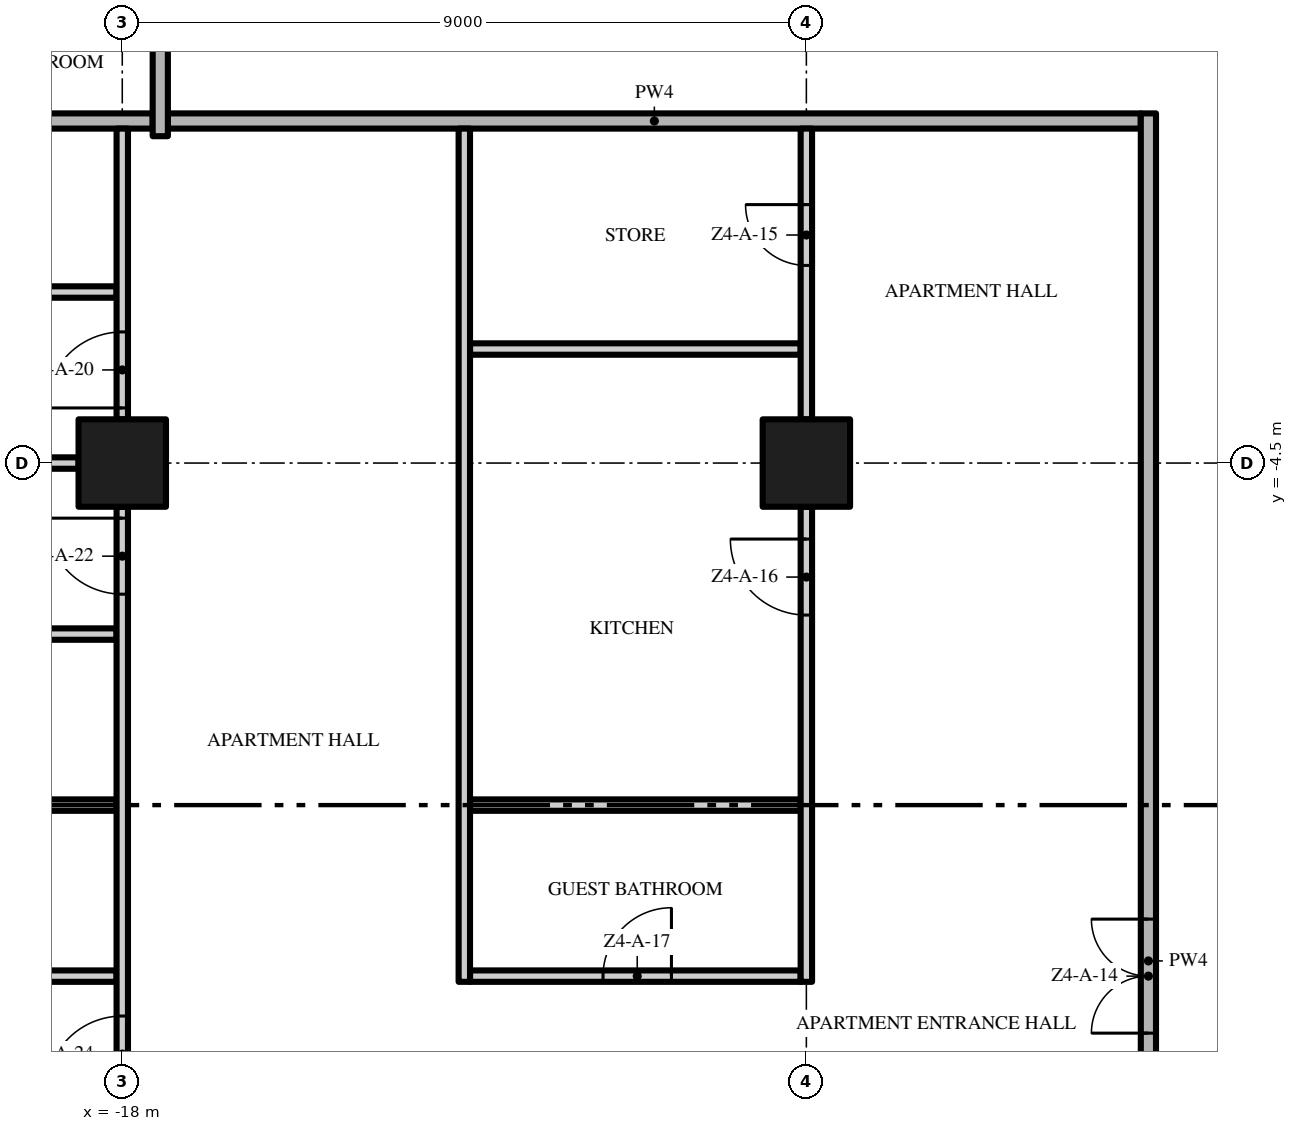
"""IFC4 building model, lengths in metres.
Left out: names, types, materials, properties, quantities, classifications, styles, units other than length and angle.
Written with IfcOpenShell. Run it as: python <this file> out.ifc"""

import sys

from ifc_helpers import new_model, si_unit, direction, frame, frame_2d, origin, origin_2d, place, context, subcontext, project, spatial, rectangle, extrude, element, fill, save


model = new_model("IFC4")
c1 = context("Model", 3, precision=1e-05, world=origin(), true_north=direction((0.0, 1.0)))
c2 = subcontext(c1, "Body", "Model", "MODEL_VIEW")
j1 = project(units=[si_unit("LENGTHUNIT", "METRE"), si_unit("PLANEANGLEUNIT", "RADIAN")], contexts=[c1])
p1 = place(None, origin())
s1 = spatial("IfcSite", under=j1, at=p1, CompositionType="ELEMENT")
p2 = place(p1, origin())
s2 = spatial("IfcBuilding", under=s1, at=p2, CompositionType="ELEMENT")
p3 = place(p2, frame((0.0, 0.0, 188.2)))
s3 = spatial("IfcBuildingStorey", under=s2, at=p3, CompositionType="ELEMENT", Elevation=188.2)
for number, where, z_axis, x_axis in (
    (1, (-18.0, -4.5, 0.0), (0.0, 0.0, 1.0), (1.0, 0.0, 0.0)),
    (2, (-9.0, -4.5, 0.0), (0.0, 0.0, 1.0), (1.0, 0.0, 0.0)),
):
    element("IfcColumn", number, at=place(p3, frame(where, z_axis=z_axis, x_axis=x_axis)), inside=s3, PredefinedType="COLUMN", context=c2, shape_type="SweptSolid", body=[
        extrude(rectangle(XDim=1.15, YDim=1.15, at=origin_2d()), origin(), (0.0, 0.0, 1.0), 3.5),
    ])
p4 = place(p3, frame((-20.925, -11.25, 0.0), z_axis=(0.0, 0.0, 1.0), x_axis=(1.0, 0.0, 0.0)))
e3 = element("IfcWall", 3, at=p4, inside=s3, PredefinedType="PARTITIONING", context=c2, shape_type="SweptSolid", body=[
    extrude(rectangle(XDim=2.85, YDim=0.15, at=frame_2d((1.425, 0.0))), origin(), (0.0, 0.0, 1.0), 3.5),
])
p5 = place(p3, frame((-13.425, -11.25, 0.0), z_axis=(0.0, 0.0, 1.0), x_axis=(1.0, 0.0, 0.0)))
e4 = element("IfcWall", 4, at=p5, inside=s3, PredefinedType="PARTITIONING", context=c2, shape_type="SweptSolid", body=[
    extrude(rectangle(XDim=4.35, YDim=0.15, at=frame_2d((2.175, 0.0))), origin(), (0.0, 0.0, 1.0), 3.5),
])
p6 = place(p5, frame((1.75, 0.0, 0.0)))
e5 = element("IfcOpeningElement", 5, at=p6, cuts=e4, PredefinedType="OPENING", context=c2, shape_type="SweptSolid", body=[
    extrude(rectangle(XDim=0.9, YDim=2.1, at=frame_2d((0.45, 1.05))), frame((0.0, 0.085, 0.0), z_axis=(0.0, -1.0, 0.0), x_axis=(1.0, 0.0, 0.0)), (0.0, 0.0, 1.0), 0.17),
])
p7 = place(p3, frame((-20.925, -9.0, 0.0), z_axis=(0.0, 0.0, 1.0), x_axis=(1.0, 0.0, 0.0)))
e6 = element("IfcWall", 6, at=p7, inside=s3, PredefinedType="PARTITIONING", context=c2, shape_type="SweptSolid", body=[
    extrude(rectangle(XDim=2.85, YDim=0.15, at=frame_2d((1.425, 0.0))), origin(), (0.0, 0.0, 1.0), 3.5),
])
p8 = place(p3, frame((-13.425, -9.0, 0.0), z_axis=(0.0, 0.0, 1.0), x_axis=(1.0, 0.0, 0.0)))
e7 = element("IfcWall", 7, at=p8, inside=s3, PredefinedType="PARTITIONING", context=c2, shape_type="SweptSolid", body=[
    extrude(rectangle(XDim=4.35, YDim=0.15, at=frame_2d((2.175, 0.0))), origin(), (0.0, 0.0, 1.0), 3.5),
])
p9 = place(p3, frame((-20.925, -6.75, 0.0), z_axis=(0.0, 0.0, 1.0), x_axis=(1.0, 0.0, 0.0)))
e8 = element("IfcWall", 8, at=p9, inside=s3, PredefinedType="PARTITIONING", context=c2, shape_type="SweptSolid", body=[
    extrude(rectangle(XDim=2.85, YDim=0.15, at=frame_2d((1.425, 0.0))), origin(), (0.0, 0.0, 1.0), 3.5),
])
p10 = place(p3, frame((-25.95, -4.5, 0.0), z_axis=(0.0, 0.0, 1.0), x_axis=(1.0, 0.0, 0.0)))
e9 = element("IfcWall", 9, at=p10, inside=s3, PredefinedType="PARTITIONING", context=c2, shape_type="SweptSolid", body=[
    extrude(rectangle(XDim=7.375, YDim=0.15, at=frame_2d((3.688, 0.0))), origin(), (0.0, 0.0, 1.0), 3.5),
])
p11 = place(p3, frame((-13.425, -3.0, 0.0), z_axis=(0.0, 0.0, 1.0), x_axis=(1.0, 0.0, 0.0)))
e10 = element("IfcWall", 10, at=p11, inside=s3, PredefinedType="PARTITIONING", context=c2, shape_type="SweptSolid", body=[
    extrude(rectangle(XDim=4.35, YDim=0.15, at=frame_2d((2.175, 0.0))), origin(), (0.0, 0.0, 1.0), 3.5),
])
p12 = place(p3, frame((-20.925, -2.25, 0.0), z_axis=(0.0, 0.0, 1.0), x_axis=(1.0, 0.0, 0.0)))
e11 = element("IfcWall", 11, at=p12, inside=s3, PredefinedType="PARTITIONING", context=c2, shape_type="SweptSolid", body=[
    extrude(rectangle(XDim=2.85, YDim=0.15, at=frame_2d((1.425, 0.0))), origin(), (0.0, 0.0, 1.0), 3.5),
])
p13 = place(p3, frame((-17.4, 0.0, 0.0), z_axis=(0.0, 0.0, 1.0), x_axis=(1.0, 0.0, 0.0)))
e12 = element("IfcWall", 12, at=p13, inside=s3, PredefinedType="PARTITIONING", context=c2, shape_type="SweptSolid", body=[
    extrude(rectangle(XDim=12.8, YDim=0.2, at=frame_2d((6.4, 0.0))), origin(), (0.0, 0.0, 1.0), 3.5),
])
p14 = place(p3, frame((-26.7, 0.0, 0.0), z_axis=(0.0, 0.0, 1.0), x_axis=(1.0, 0.0, 0.0)))
e13 = element("IfcWall", 13, at=p14, inside=s3, PredefinedType="PARTITIONING", context=c2, shape_type="SweptSolid", body=[
    extrude(rectangle(XDim=9.1, YDim=0.2, at=frame_2d((4.55, 0.0))), origin(), (0.0, 0.0, 1.0), 3.5),
])
p15 = place(p3, frame((-18.0, -12.925, 0.0), z_axis=(0.0, 0.0, 1.0), x_axis=(0.0, 1.0, 0.0)))
e14 = element("IfcWall", 14, at=p15, inside=s3, PredefinedType="PARTITIONING", context=c2, shape_type="SweptSolid", body=[
    extrude(rectangle(XDim=7.85, YDim=0.15, at=frame_2d((3.925, 0.0))), origin(), (0.0, 0.0, 1.0), 3.5),
])
p16 = place(p15, frame((6.7, 0.0, 0.0)))
e15 = element("IfcOpeningElement", 15, at=p16, cuts=e14, PredefinedType="OPENING", context=c2, shape_type="SweptSolid", body=[
    extrude(rectangle(XDim=1.0, YDim=2.4, at=frame_2d((0.5, 1.2))), frame((0.0, 0.085, 0.0), z_axis=(0.0, -1.0, 0.0), x_axis=(1.0, 0.0, 0.0)), (0.0, 0.0, 1.0), 0.17),
])
p17 = place(p15, frame((0.15, 0.0, 0.0)))
e16 = element("IfcOpeningElement", 16, at=p17, cuts=e14, PredefinedType="OPENING", context=c2, shape_type="SweptSolid", body=[
    extrude(rectangle(XDim=1.0, YDim=2.4, at=frame_2d((0.5, 1.2))), frame((0.0, 0.085, 0.0), z_axis=(0.0, -1.0, 0.0), x_axis=(1.0, 0.0, 0.0)), (0.0, 0.0, 1.0), 0.17),
])
p18 = place(p3, frame((-18.0, -3.925, 0.0), z_axis=(0.0, 0.0, 1.0), x_axis=(0.0, 1.0, 0.0)))
e17 = element("IfcWall", 17, at=p18, inside=s3, PredefinedType="PARTITIONING", context=c2, shape_type="SweptSolid", body=[
    extrude(rectangle(XDim=3.825, YDim=0.15, at=frame_2d((1.913, 0.0))), origin(), (0.0, 0.0, 1.0), 3.5),
])
p19 = place(p18, frame((0.15, 0.0, 0.0)))
e18 = element("IfcOpeningElement", 18, at=p19, cuts=e17, PredefinedType="OPENING", context=c2, shape_type="SweptSolid", body=[
    extrude(rectangle(XDim=1.0, YDim=2.4, at=frame_2d((0.5, 1.2))), frame((0.0, 0.085, 0.0), z_axis=(0.0, -1.0, 0.0), x_axis=(1.0, 0.0, 0.0)), (0.0, 0.0, 1.0), 0.17),
])
p20 = place(p3, frame((-17.5, -0.2, 0.0), z_axis=(0.0, 0.0, 1.0), x_axis=(0.0, 1.0, 0.0)))
e19 = element("IfcWall", 19, at=p20, inside=s3, PredefinedType="PARTITIONING", context=c2, shape_type="SweptSolid", body=[
    extrude(rectangle(XDim=4.125, YDim=0.2, at=frame_2d((2.062, 0.0))), origin(), (0.0, 0.0, 1.0), 3.5),
])
p21 = place(p3, frame((-13.5, -11.325, 0.0), z_axis=(0.0, 0.0, 1.0), x_axis=(0.0, 1.0, 0.0)))
e20 = element("IfcWall", 20, at=p21, inside=s3, PredefinedType="PARTITIONING", context=c2, shape_type="SweptSolid", body=[
    extrude(rectangle(XDim=11.225, YDim=0.15, at=frame_2d((5.612, 0.0))), origin(), (0.0, 0.0, 1.0), 3.5),
])
p22 = place(p3, frame((-9.0, -11.325, 0.0), z_axis=(0.0, 0.0, 1.0), x_axis=(0.0, 1.0, 0.0)))
e21 = element("IfcWall", 21, at=p22, inside=s3, PredefinedType="PARTITIONING", context=c2, shape_type="SweptSolid", body=[
    extrude(rectangle(XDim=6.25, YDim=0.15, at=frame_2d((3.125, 0.0))), origin(), (0.0, 0.0, 1.0), 3.5),
])
p23 = place(p22, frame((4.825, 0.0, 0.0)))
e22 = element("IfcOpeningElement", 22, at=p23, cuts=e21, PredefinedType="OPENING", context=c2, shape_type="SweptSolid", body=[
    extrude(rectangle(XDim=1.0, YDim=2.4, at=frame_2d((0.5, 1.2))), frame((0.0, 0.085, 0.0), z_axis=(0.0, -1.0, 0.0), x_axis=(1.0, 0.0, 0.0)), (0.0, 0.0, 1.0), 0.17),
])
p24 = place(p3, frame((-9.0, -3.925, 0.0), z_axis=(0.0, 0.0, 1.0), x_axis=(0.0, 1.0, 0.0)))
e23 = element("IfcWall", 23, at=p24, inside=s3, PredefinedType="PARTITIONING", context=c2, shape_type="SweptSolid", body=[
    extrude(rectangle(XDim=3.825, YDim=0.15, at=frame_2d((1.913, 0.0))), origin(), (0.0, 0.0, 1.0), 3.5),
])
p25 = place(p24, frame((2.025, 0.0, 0.0)))
e24 = element("IfcOpeningElement", 24, at=p25, cuts=e23, PredefinedType="OPENING", context=c2, shape_type="SweptSolid", body=[
    extrude(rectangle(XDim=0.8, YDim=2.0, at=frame_2d((0.4, 1.0))), frame((0.0, 0.085, 0.0), z_axis=(0.0, -1.0, 0.0), x_axis=(1.0, 0.0, 0.0)), (0.0, 0.0, 1.0), 0.17),
])
p26 = place(p3, frame((-4.5, -22.2, 0.0), z_axis=(0.0, 0.0, 1.0), x_axis=(0.0, 1.0, 0.0)))
e25 = element("IfcWall", 25, at=p26, inside=s3, PredefinedType="PARTITIONING", context=c2, shape_type="SweptSolid", body=[
    extrude(rectangle(XDim=22.3, YDim=0.2, at=frame_2d((11.15, 0.0))), origin(), (0.0, 0.0, 1.0), 3.5),
])
p27 = place(p26, frame((10.2, 0.0, 0.0)))
e26 = element("IfcOpeningElement", 26, at=p27, cuts=e25, PredefinedType="OPENING", context=c2, shape_type="SweptSolid", body=[
    extrude(rectangle(XDim=1.5, YDim=2.4, at=frame_2d((0.75, 1.2))), frame((0.0, 0.11, 0.0), z_axis=(0.0, -1.0, 0.0), x_axis=(1.0, 0.0, 0.0)), (0.0, 0.0, 1.0), 0.22),
])
p28 = place(p27, origin())
e27 = element("IfcDoor", 27, at=p28, inside=s3, OperationType="DOUBLE_DOOR_SINGLE_SWING", PredefinedType="DOOR", context=c2, shape_type="SweptSolid", body=[
    extrude(rectangle(XDim=1.5, YDim=2.4, at=frame_2d((0.75, 1.2))), frame((0.0, 0.025, 0.0), z_axis=(0.0, -1.0, 0.0), x_axis=(1.0, 0.0, 0.0)), (0.0, 0.0, 1.0), 0.05),
])
fill(e26, e27)
p29 = place(p25, origin())
e28 = element("IfcDoor", 28, at=p29, inside=s3, OperationType="SINGLE_SWING_RIGHT", PredefinedType="DOOR", context=c2, shape_type="SweptSolid", body=[
    extrude(rectangle(XDim=0.8, YDim=2.0, at=frame_2d((0.4, 1.0))), frame((0.0, 0.025, 0.0), z_axis=(0.0, -1.0, 0.0), x_axis=(1.0, 0.0, 0.0)), (0.0, 0.0, 1.0), 0.05),
])
fill(e24, e28)
p30 = place(p23, origin())
e29 = element("IfcDoor", 29, at=p30, inside=s3, OperationType="SINGLE_SWING_RIGHT", PredefinedType="DOOR", context=c2, shape_type="SweptSolid", body=[
    extrude(rectangle(XDim=1.0, YDim=2.4, at=frame_2d((0.5, 1.2))), frame((0.0, 0.025, 0.0), z_axis=(0.0, -1.0, 0.0), x_axis=(1.0, 0.0, 0.0)), (0.0, 0.0, 1.0), 0.05),
])
fill(e22, e29)
p31 = place(p6, origin())
e30 = element("IfcDoor", 30, at=p31, inside=s3, OperationType="SINGLE_SWING_RIGHT", PredefinedType="DOOR", context=c2, shape_type="SweptSolid", body=[
    extrude(rectangle(XDim=0.9, YDim=2.1, at=frame_2d((0.45, 1.05))), frame((0.0, 0.025, 0.0), z_axis=(0.0, -1.0, 0.0), x_axis=(1.0, 0.0, 0.0)), (0.0, 0.0, 1.0), 0.05),
])
fill(e5, e30)
p32 = place(p19, origin())
e31 = element("IfcDoor", 31, at=p32, inside=s3, OperationType="SINGLE_SWING_LEFT", PredefinedType="DOOR", context=c2, shape_type="SweptSolid", body=[
    extrude(rectangle(XDim=1.0, YDim=2.4, at=frame_2d((0.5, 1.2))), frame((0.0, 0.025, 0.0), z_axis=(0.0, -1.0, 0.0), x_axis=(1.0, 0.0, 0.0)), (0.0, 0.0, 1.0), 0.05),
])
fill(e18, e31)
p33 = place(p16, origin())
e32 = element("IfcDoor", 32, at=p33, inside=s3, OperationType="SINGLE_SWING_RIGHT", PredefinedType="DOOR", context=c2, shape_type="SweptSolid", body=[
    extrude(rectangle(XDim=1.0, YDim=2.4, at=frame_2d((0.5, 1.2))), frame((0.0, 0.025, 0.0), z_axis=(0.0, -1.0, 0.0), x_axis=(1.0, 0.0, 0.0)), (0.0, 0.0, 1.0), 0.05),
])
fill(e15, e32)
p34 = place(p17, origin())
e33 = element("IfcDoor", 33, at=p34, inside=s3, OperationType="SINGLE_SWING_LEFT", PredefinedType="DOOR", context=c2, shape_type="SweptSolid", body=[
    extrude(rectangle(XDim=1.0, YDim=2.4, at=frame_2d((0.5, 1.2))), frame((0.0, 0.025, 0.0), z_axis=(0.0, -1.0, 0.0), x_axis=(1.0, 0.0, 0.0)), (0.0, 0.0, 1.0), 0.05),
])
fill(e16, e33)
save(model, sys.argv[1])
